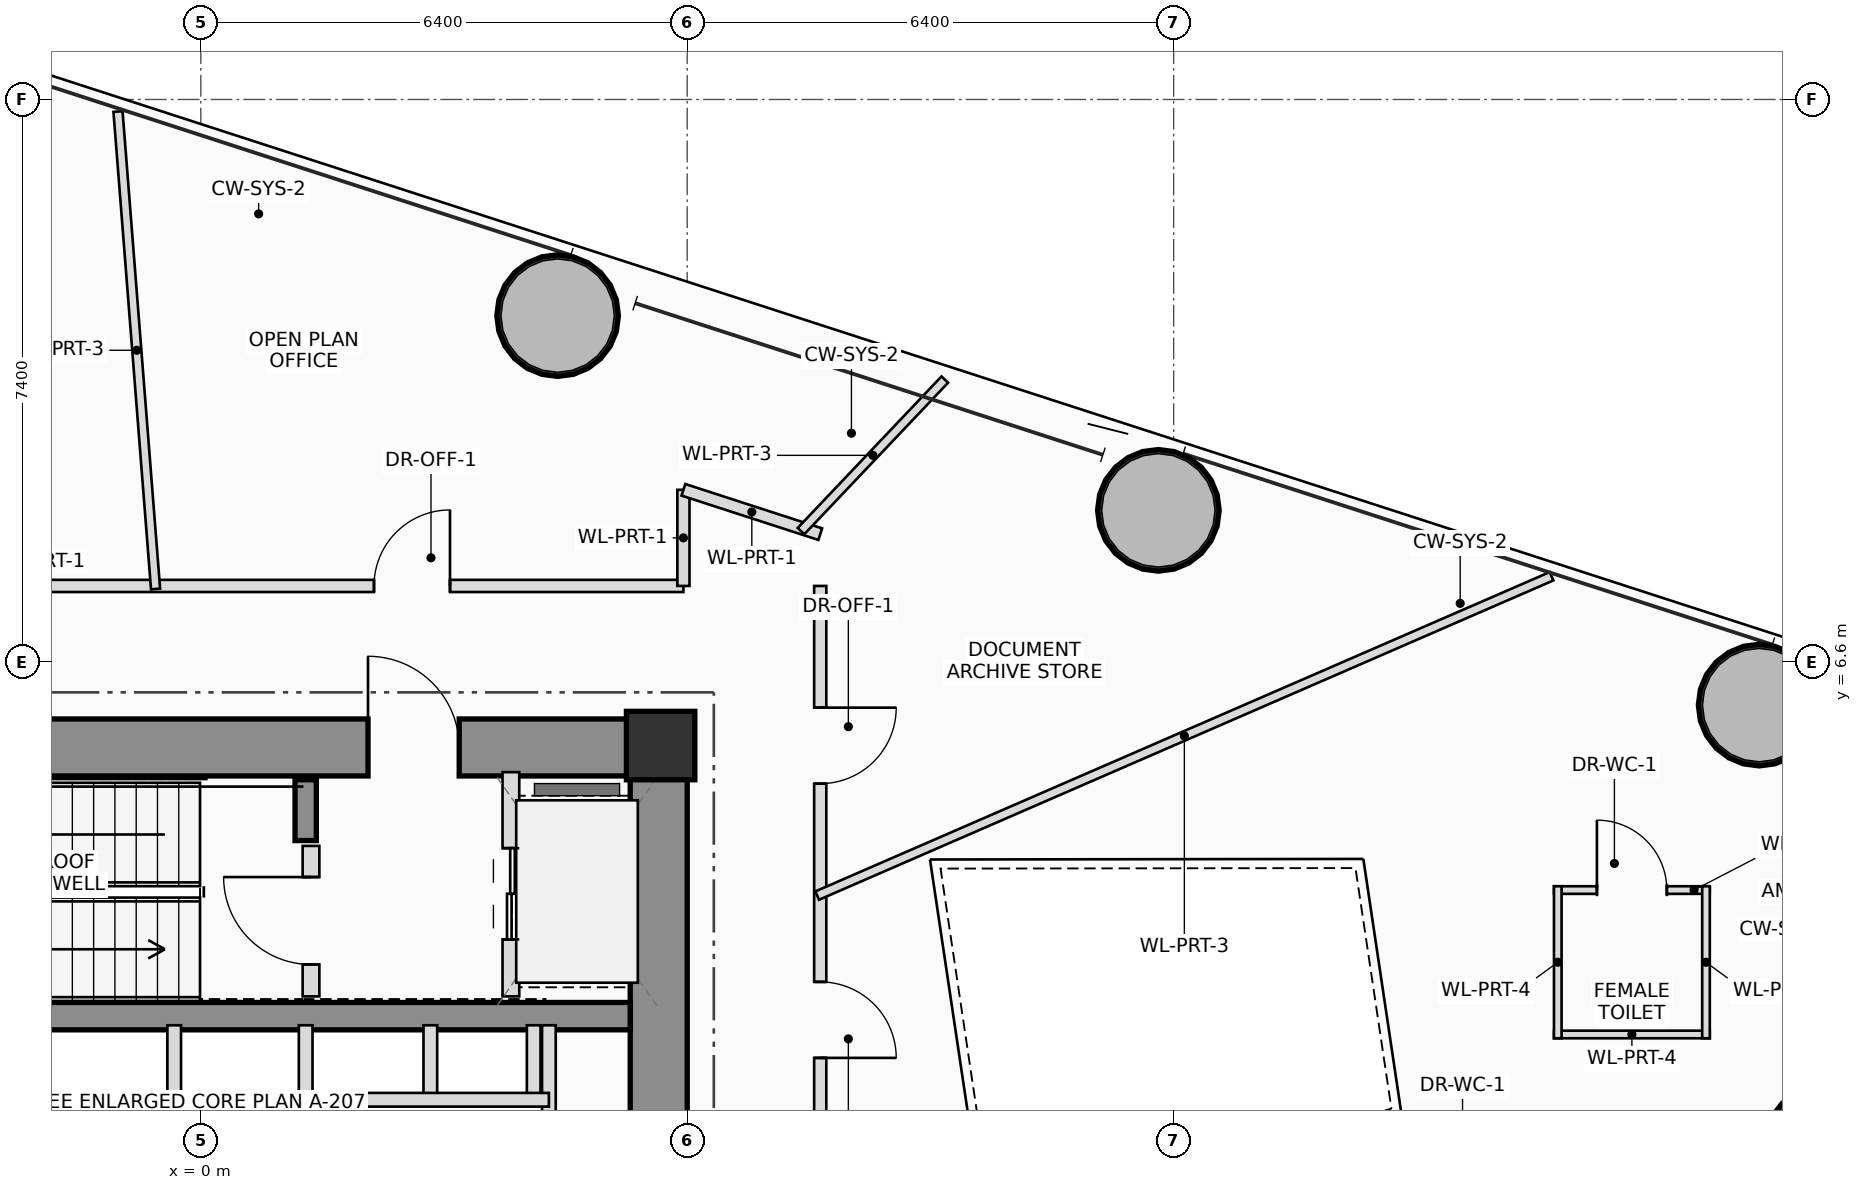
"""IFC4 building model, lengths in metres.
Left out: names, types, materials, properties, quantities, classifications, styles, units other than length and angle.
Written with IfcOpenShell. Run it as: python <this file> out.ifc"""

import sys

from ifc_helpers import new_model, si_unit, direction, frame, frame_2d, origin, origin_2d, place, context, subcontext, project, spatial, rectangle, hollow_circle, extrude, source, transform, mapped, element, fill, save


model = new_model("IFC4")
c1 = context("Model", 3, precision=1e-05, world=origin(), true_north=direction((0.0, 1.0)))
c2 = subcontext(c1, "Body", "Model", "MODEL_VIEW")
j1 = project(units=[si_unit("LENGTHUNIT", "METRE"), si_unit("PLANEANGLEUNIT", "RADIAN")], contexts=[c1])
p1 = place(None, origin())
s1 = spatial("IfcSite", under=j1, at=p1, CompositionType="ELEMENT")
p2 = place(p1, origin())
s2 = spatial("IfcBuilding", under=s1, at=p2, CompositionType="ELEMENT")
p3 = place(p2, frame((0.0, 0.0, 77.3)))
s3 = spatial("IfcBuildingStorey", under=s2, at=p3, CompositionType="ELEMENT", Elevation=77.3)
m1 = source(origin(), c2, "Body", "SweptSolid", [
    extrude(rectangle(XDim=0.9, YDim=0.9, at=origin_2d()), origin(), (0.0, 0.0, 1.0), 3.75),
])
p4 = place(p3, frame((6.05, 5.5, 0.0), z_axis=(0.0, 0.0, 1.0), x_axis=(1.0, 0.0, 0.0)))
e1 = element("IfcColumn", 1, at=p4, inside=s3, PredefinedType="COLUMN", context=c2, shape_type="MappedRepresentation", body=[
    mapped(m1, transform((0.0, 0.0, 0.0), scale=1.0)),
])
p5 = place(p3, frame((-6.4, 5.475, 0.0), z_axis=(0.0, 0.0, 1.0), x_axis=(1.0, 0.0, 0.0)))
e2 = element("IfcWall", 2, at=p5, inside=s3, PredefinedType="SHEAR", context=c2, shape_type="SweptSolid", body=[
    extrude(rectangle(XDim=12.8, YDim=0.75, at=frame_2d((6.4, 0.0))), origin(), (0.0, 0.0, 1.0), 3.75),
])
p6 = place(p5, frame((8.6, 0.0, 0.0)))
e3 = element("IfcOpeningElement", 3, at=p6, cuts=e2, PredefinedType="OPENING", context=c2, shape_type="SweptSolid", body=[
    extrude(rectangle(XDim=1.2, YDim=2.2, at=frame_2d((0.6, 1.1))), frame((0.0, 0.385, 0.0), z_axis=(0.0, -1.0, 0.0), x_axis=(1.0, 0.0, 0.0)), (0.0, 0.0, 1.0), 0.77),
])
p7 = place(p3, frame((6.025, -5.1, 0.0), z_axis=(0.0, 0.0, 1.0), x_axis=(0.0, 1.0, 0.0)))
e4 = element("IfcWall", 4, at=p7, inside=s3, PredefinedType="SHEAR", context=c2, shape_type="SweptSolid", body=[
    extrude(rectangle(XDim=10.2, YDim=0.75, at=frame_2d((5.1, 0.0))), origin(), (0.0, 0.0, 1.0), 3.75),
])
p8 = place(p3, frame((-5.65, 1.94, 0.0), z_axis=(0.0, 0.0, 1.0), x_axis=(1.0, 0.0, 0.0)))
e5 = element("IfcWall", 5, at=p8, inside=s3, PredefinedType="SHEAR", context=c2, shape_type="SweptSolid", body=[
    extrude(rectangle(XDim=11.3, YDim=0.36, at=frame_2d((5.65, 0.0))), origin(), (0.0, 0.0, 1.0), 3.75),
])
p9 = place(p3, frame((1.38, 4.25, 0.0), z_axis=(0.0, 0.0, 1.0), x_axis=(0.0, 1.0, 0.0)))
e6 = element("IfcWall", 6, at=p9, inside=s3, PredefinedType="SHEAR", context=c2, shape_type="SweptSolid", body=[
    extrude(rectangle(XDim=0.8, YDim=0.28, at=frame_2d((0.4, 0.0))), origin(), (0.0, 0.0, 1.0), 3.75),
])
m2 = source(origin(), c2, "Body", "SweptSolid", [
    extrude(hollow_circle(Radius=0.8, WallThickness=0.055, at=origin_2d()), origin(), (0.0, 0.0, 1.0), 3.75),
])
for number, where, z_axis, x_axis in (
    (7, (21.371, 0.226, 0.0), (0.0, 0.0, 1.0), (1.0, 0.0, 0.0)),
    (8, (20.503, 6.032, 0.0), (0.0, 0.0, 1.0), (1.0, 0.0, 0.0)),
    (9, (12.599, 8.594, 0.0), (0.0, 0.0, 1.0), (1.0, 0.0, 0.0)),
    (10, (4.695, 11.157, 0.0), (0.0, 0.0, 1.0), (1.0, 0.0, 0.0)),
):
    element("IfcColumn", number, at=place(p3, frame(where, z_axis=z_axis, x_axis=x_axis)), inside=s3, PredefinedType="COLUMN", context=c2, shape_type="MappedRepresentation", body=[
        mapped(m2, transform((0.0, 0.0, 0.0), scale=1.0)),
    ])
p10 = place(p3, frame((1.45, 2.2, 0.0), z_axis=(0.0, 0.0, 1.0), x_axis=(0.0, 1.0, 0.0)))
e11 = element("IfcWall", 11, at=p10, inside=s3, PredefinedType="PLUMBINGWALL", context=c2, shape_type="SweptSolid", body=[
    extrude(rectangle(XDim=1.98, YDim=0.22, at=frame_2d((0.99, 0.0))), origin(), (0.0, 0.0, 1.0), 3.545),
])
p11 = place(p10, frame((0.42, 0.0, 0.0)))
e12 = element("IfcOpeningElement", 12, at=p11, cuts=e11, PredefinedType="OPENING", context=c2, shape_type="SweptSolid", body=[
    extrude(rectangle(XDim=1.15, YDim=2.15, at=frame_2d((0.575, 1.075))), frame((0.0, 0.12, 0.0), z_axis=(0.0, -1.0, 0.0), x_axis=(1.0, 0.0, 0.0)), (0.0, 0.0, 1.0), 0.24),
])
p12 = place(p3, frame((4.08, 2.2, 0.0), z_axis=(0.0, 0.0, 1.0), x_axis=(0.0, 1.0, 0.0)))
e13 = element("IfcWall", 13, at=p12, inside=s3, PredefinedType="PLUMBINGWALL", context=c2, shape_type="SweptSolid", body=[
    extrude(rectangle(XDim=2.95, YDim=0.22, at=frame_2d((1.475, 0.0))), origin(), (0.0, 0.0, 1.0), 3.545),
])
p13 = place(p12, frame((0.75, 0.0, 0.0)))
e14 = element("IfcOpeningElement", 14, at=p13, cuts=e13, PredefinedType="OPENING", context=c2, shape_type="SweptSolid", body=[
    extrude(rectangle(XDim=1.2, YDim=2.25, at=frame_2d((0.6, 1.125))), frame((0.0, 0.12, 0.0), z_axis=(0.0, -1.0, 0.0), x_axis=(1.0, 0.0, 0.0)), (0.0, 0.0, 1.0), 0.24),
])
p14 = place(p3, frame((1.38, -0.84, 0.0), z_axis=(0.0, 0.0, 1.0), x_axis=(0.0, 1.0, 0.0)))
e15 = element("IfcWall", 15, at=p14, inside=s3, PredefinedType="PARTITIONING", context=c2, shape_type="SweptSolid", body=[
    extrude(rectangle(XDim=1.68, YDim=0.1, at=frame_2d((0.84, 0.0))), origin(), (0.0, 0.0, 1.0), 3.545),
])
p15 = place(p14, frame((0.34, 0.0, 0.0)))
e16 = element("IfcOpeningElement", 16, at=p15, cuts=e15, PredefinedType="OPENING", context=c2, shape_type="SweptSolid", body=[
    extrude(rectangle(XDim=1.0, YDim=2.25, at=frame_2d((0.5, 1.125))), frame((0.0, 0.06, 0.0), z_axis=(0.0, -1.0, 0.0), x_axis=(1.0, 0.0, 0.0)), (0.0, 0.0, 1.0), 0.12),
])
for number, where, z_axis, x_axis in (
    (17, (-0.35, 0.84, 0.0), (0.0, 0.0, 1.0), (0.0, 1.0, 0.0)),
    (18, (1.38, 0.84, 0.0), (0.0, 0.0, 1.0), (0.0, 1.0, 0.0)),
    (19, (3.02, 0.84, 0.0), (0.0, 0.0, 1.0), (0.0, 1.0, 0.0)),
    (20, (4.38, 0.84, 0.0), (0.0, 0.0, 1.0), (0.0, 1.0, 0.0)),
):
    element("IfcWall", number, at=place(p3, frame(where, z_axis=z_axis, x_axis=x_axis)), inside=s3, PredefinedType="PLUMBINGWALL", context=c2, shape_type="SweptSolid", body=[
        extrude(rectangle(XDim=0.98, YDim=0.18, at=frame_2d((0.49, 0.0))), origin(), (0.0, 0.0, 1.0), 3.545),
    ])
p16 = place(p3, frame((4.58, -1.82, 0.0), z_axis=(0.0, 0.0, 1.0), x_axis=(0.0, 1.0, 0.0)))
e21 = element("IfcWall", 21, at=p16, inside=s3, PredefinedType="PLUMBINGWALL", context=c2, shape_type="SweptSolid", body=[
    extrude(rectangle(XDim=3.64, YDim=0.18, at=frame_2d((1.82, 0.0))), origin(), (0.0, 0.0, 1.0), 3.545),
])
p17 = place(p16, frame((1.35, 0.0, 0.0)))
e22 = element("IfcOpeningElement", 22, at=p17, cuts=e21, PredefinedType="OPENING", context=c2, shape_type="SweptSolid", body=[
    extrude(rectangle(XDim=0.9, YDim=2.05, at=frame_2d((0.45, 1.025))), frame((0.0, 0.1, 0.0), z_axis=(0.0, -1.0, 0.0), x_axis=(1.0, 0.0, 0.0)), (0.0, 0.0, 1.0), 0.2),
])
p18 = place(p3, frame((-5.68, 0.84, 0.0), z_axis=(0.0, 0.0, 1.0), x_axis=(1.0, 0.0, 0.0)))
e23 = element("IfcWall", 23, at=p18, inside=s3, PredefinedType="PLUMBINGWALL", context=c2, shape_type="SweptSolid", body=[
    extrude(rectangle(XDim=10.26, YDim=0.18, at=frame_2d((5.13, 0.0))), origin(), (0.0, 0.0, 1.0), 3.545),
])
p19 = place(p18, frame((0.43, 0.0, 0.0)))
e24 = element("IfcOpeningElement", 24, at=p19, cuts=e23, PredefinedType="OPENING", context=c2, shape_type="SweptSolid", body=[
    extrude(rectangle(XDim=1.1, YDim=2.2, at=frame_2d((0.55, 1.1))), frame((0.0, 0.1, 0.0), z_axis=(0.0, -1.0, 0.0), x_axis=(1.0, 0.0, 0.0)), (0.0, 0.0, 1.0), 0.2),
])
p20 = place(p18, frame((2.13, 0.0, 0.0)))
e25 = element("IfcOpeningElement", 25, at=p20, cuts=e23, PredefinedType="OPENING", context=c2, shape_type="SweptSolid", body=[
    extrude(rectangle(XDim=1.1, YDim=2.2, at=frame_2d((0.55, 1.1))), frame((0.0, 0.1, 0.0), z_axis=(0.0, -1.0, 0.0), x_axis=(1.0, 0.0, 0.0)), (0.0, 0.0, 1.0), 0.2),
])
p21 = place(p3, frame((17.804, 3.599, 0.0), z_axis=(0.0, 0.0, 1.0), x_axis=(1.0, 0.0, 0.0)))
e26 = element("IfcWall", 26, at=p21, inside=s3, PredefinedType="PARTITIONING", context=c2, shape_type="SweptSolid", body=[
    extrude(rectangle(XDim=2.05, YDim=0.1, at=frame_2d((1.025, 0.0))), origin(), (0.0, 0.0, 1.0), 3.545),
])
p22 = place(p21, frame((0.565, 0.0, 0.0)))
e27 = element("IfcOpeningElement", 27, at=p22, cuts=e26, PredefinedType="OPENING", context=c2, shape_type="SweptSolid", body=[
    extrude(rectangle(XDim=0.92, YDim=2.1, at=frame_2d((0.46, 1.05))), frame((0.0, 0.06, 0.0), z_axis=(0.0, -1.0, 0.0), x_axis=(1.0, 0.0, 0.0)), (0.0, 0.0, 1.0), 0.12),
])
p23 = place(p3, frame((19.854, 1.699, 0.0), z_axis=(0.0, 0.0, 1.0), x_axis=(-1.0, 0.0, 0.0)))
e28 = element("IfcWall", 28, at=p23, inside=s3, PredefinedType="PARTITIONING", context=c2, shape_type="SweptSolid", body=[
    extrude(rectangle(XDim=2.05, YDim=0.1, at=frame_2d((1.025, 0.0))), origin(), (0.0, 0.0, 1.0), 3.545),
])
for number, where, z_axis, x_axis in (
    (29, (19.804, 3.649, 0.0), (0.0, 0.0, 1.0), (0.0, -1.0, 0.0)),
    (30, (17.854, 1.649, 0.0), (0.0, 0.0, 1.0), (0.0, 1.0, 0.0)),
):
    element("IfcWall", number, at=place(p3, frame(where, z_axis=z_axis, x_axis=x_axis)), inside=s3, PredefinedType="PARTITIONING", context=c2, shape_type="SweptSolid", body=[
        extrude(rectangle(XDim=2.0, YDim=0.1, at=frame_2d((1.0, 0.0))), origin(), (0.0, 0.0, 1.0), 3.545),
    ])
p24 = place(p3, frame((-6.35, 7.6, 0.0), z_axis=(0.0, 0.0, 1.0), x_axis=(1.0, 0.0, 0.0)))
e31 = element("IfcWall", 31, at=p24, inside=s3, PredefinedType="PARTITIONING", context=c2, shape_type="SweptSolid", body=[
    extrude(rectangle(XDim=12.7, YDim=0.16, at=frame_2d((6.35, 0.0))), origin(), (0.0, 0.0, 1.0), 2.85),
])
p25 = place(p24, frame((8.629, 0.0, 0.0)))
e32 = element("IfcOpeningElement", 32, at=p25, cuts=e31, PredefinedType="OPENING", context=c2, shape_type="SweptSolid", body=[
    extrude(rectangle(XDim=1.0, YDim=2.25, at=frame_2d((0.5, 1.125))), frame((0.0, 0.09, 0.0), z_axis=(0.0, -1.0, 0.0), x_axis=(1.0, 0.0, 0.0)), (0.0, 0.0, 1.0), 0.18),
])
p26 = place(p3, frame((6.35, 7.6, 0.0), z_axis=(0.0, 0.0, 1.0), x_axis=(0.0, 1.0, 0.0)))
e33 = element("IfcWall", 33, at=p26, inside=s3, PredefinedType="PARTITIONING", context=c2, shape_type="SweptSolid", body=[
    extrude(rectangle(XDim=1.265, YDim=0.16, at=frame_2d((0.632, 0.0))), origin(), (0.0, 0.0, 1.0), 3.05),
])
p27 = place(p3, frame((6.35, 8.865, 0.0), z_axis=(0.0, 0.0, 1.0), x_axis=(0.951257609277, -0.30839740724, 0.0)))
e34 = element("IfcWall", 34, at=p27, inside=s3, PredefinedType="PARTITIONING", context=c2, shape_type="SweptSolid", body=[
    extrude(rectangle(XDim=1.892, YDim=0.16, at=frame_2d((0.946, 0.0))), origin(), (0.0, 0.0, 1.0), 3.2),
])
p28 = place(p3, frame((8.15, 7.6, 0.0), z_axis=(0.0, 0.0, 1.0), x_axis=(0.0, -1.0, 0.0)))
e35 = element("IfcWall", 35, at=p28, inside=s3, PredefinedType="PARTITIONING", context=c2, shape_type="SweptSolid", body=[
    extrude(rectangle(XDim=7.58, YDim=0.16, at=frame_2d((3.79, 0.0))), origin(), (0.0, 0.0, 1.0), 2.85),
])
p29 = place(p28, frame((1.601, 0.0, 0.0)))
e36 = element("IfcOpeningElement", 36, at=p29, cuts=e35, PredefinedType="OPENING", context=c2, shape_type="SweptSolid", body=[
    extrude(rectangle(XDim=1.0, YDim=2.25, at=frame_2d((0.5, 1.125))), frame((0.0, 0.09, 0.0), z_axis=(0.0, -1.0, 0.0), x_axis=(1.0, 0.0, 0.0)), (0.0, 0.0, 1.0), 0.18),
])
p30 = place(p28, frame((5.209, 0.0, 0.0)))
e37 = element("IfcOpeningElement", 37, at=p30, cuts=e35, PredefinedType="OPENING", context=c2, shape_type="SweptSolid", body=[
    extrude(rectangle(XDim=1.0, YDim=2.25, at=frame_2d((0.5, 1.125))), frame((0.0, 0.09, 0.0), z_axis=(0.0, -1.0, 0.0), x_axis=(1.0, 0.0, 0.0)), (0.0, 0.0, 1.0), 0.18),
])
p31 = place(p3, frame((8.11, 3.526, 0.0), z_axis=(0.0, 0.0, 1.0), x_axis=(0.917062319349, 0.398743905823, 0.0)))
e38 = element("IfcWall", 38, at=p31, inside=s3, PredefinedType="PARTITIONING", context=c2, shape_type="SweptSolid", body=[
    extrude(rectangle(XDim=10.535, YDim=0.12, at=frame_2d((5.268, 0.0))), origin(), (0.0, 0.0, 1.0), 2.85),
])
p32 = place(p3, frame((7.897, 8.321, 0.0), z_axis=(0.0, 0.0, 1.0), x_axis=(0.688345527251, 0.725382957556, 0.0)))
e39 = element("IfcWall", 39, at=p32, inside=s3, PredefinedType="PARTITIONING", context=c2, shape_type="SweptSolid", body=[
    extrude(rectangle(XDim=2.749, YDim=0.12, at=frame_2d((1.375, 0.0))), origin(), (0.0, 0.0, 1.0), 3.01),
])
p33 = place(p3, frame((-0.595, 7.56, 0.0), z_axis=(0.0, 0.0, 1.0), x_axis=(-0.07846535306, 0.996916841251, 0.0)))
e40 = element("IfcWall", 40, at=p33, inside=s3, PredefinedType="PARTITIONING", context=c2, shape_type="SweptSolid", body=[
    extrude(rectangle(XDim=6.301, YDim=0.12, at=frame_2d((3.15, 0.0))), origin(), (0.0, 0.0, 1.0), 3.01),
])
p34 = place(p6, origin())
e41 = element("IfcDoor", 41, at=p34, inside=s3, OperationType="SINGLE_SWING_LEFT", PredefinedType="DOOR", context=c2, shape_type="SweptSolid", body=[
    extrude(rectangle(XDim=1.2, YDim=2.2, at=frame_2d((0.6, 1.1))), frame((0.0, 0.025, 0.0), z_axis=(0.0, -1.0, 0.0), x_axis=(1.0, 0.0, 0.0)), (0.0, 0.0, 1.0), 0.05),
])
fill(e3, e41)
p35 = place(p11, origin())
e42 = element("IfcDoor", 42, at=p35, inside=s3, OperationType="SINGLE_SWING_RIGHT", PredefinedType="DOOR", context=c2, shape_type="SweptSolid", body=[
    extrude(rectangle(XDim=1.15, YDim=2.15, at=frame_2d((0.575, 1.075))), frame((0.0, 0.025, 0.0), z_axis=(0.0, -1.0, 0.0), x_axis=(1.0, 0.0, 0.0)), (0.0, 0.0, 1.0), 0.05),
])
fill(e12, e42)
p36 = place(p13, origin())
e43 = element("IfcDoor", 43, at=p36, inside=s3, OperationType="DOUBLE_DOOR_SLIDING", PredefinedType="DOOR", context=c2, shape_type="SweptSolid", body=[
    extrude(rectangle(XDim=1.2, YDim=2.25, at=frame_2d((0.6, 1.125))), frame((0.0, 0.025, 0.0), z_axis=(0.0, -1.0, 0.0), x_axis=(1.0, 0.0, 0.0)), (0.0, 0.0, 1.0), 0.05),
])
fill(e14, e43)
p37 = place(p22, origin())
e44 = element("IfcDoor", 44, at=p37, inside=s3, OperationType="SINGLE_SWING_LEFT", PredefinedType="DOOR", context=c2, shape_type="SweptSolid", body=[
    extrude(rectangle(XDim=0.92, YDim=2.1, at=frame_2d((0.46, 1.05))), frame((0.0, 0.025, 0.0), z_axis=(0.0, -1.0, 0.0), x_axis=(1.0, 0.0, 0.0)), (0.0, 0.0, 1.0), 0.05),
])
fill(e27, e44)
p38 = place(p25, origin())
e45 = element("IfcDoor", 45, at=p38, inside=s3, OperationType="SINGLE_SWING_RIGHT", PredefinedType="DOOR", context=c2, shape_type="SweptSolid", body=[
    extrude(rectangle(XDim=1.0, YDim=2.25, at=frame_2d((0.5, 1.125))), frame((0.0, 0.025, 0.0), z_axis=(0.0, -1.0, 0.0), x_axis=(1.0, 0.0, 0.0)), (0.0, 0.0, 1.0), 0.05),
])
fill(e32, e45)
p39 = place(p29, origin())
e46 = element("IfcDoor", 46, at=p39, inside=s3, OperationType="SINGLE_SWING_LEFT", PredefinedType="DOOR", context=c2, shape_type="SweptSolid", body=[
    extrude(rectangle(XDim=1.0, YDim=2.25, at=frame_2d((0.5, 1.125))), frame((0.0, 0.025, 0.0), z_axis=(0.0, -1.0, 0.0), x_axis=(1.0, 0.0, 0.0)), (0.0, 0.0, 1.0), 0.05),
])
fill(e36, e46)
p40 = place(p30, origin())
e47 = element("IfcDoor", 47, at=p40, inside=s3, OperationType="SINGLE_SWING_RIGHT", PredefinedType="DOOR", context=c2, shape_type="SweptSolid", body=[
    extrude(rectangle(XDim=1.0, YDim=2.25, at=frame_2d((0.5, 1.125))), frame((0.0, 0.025, 0.0), z_axis=(0.0, -1.0, 0.0), x_axis=(1.0, 0.0, 0.0)), (0.0, 0.0, 1.0), 0.05),
])
fill(e37, e47)
save(model, sys.argv[1])
